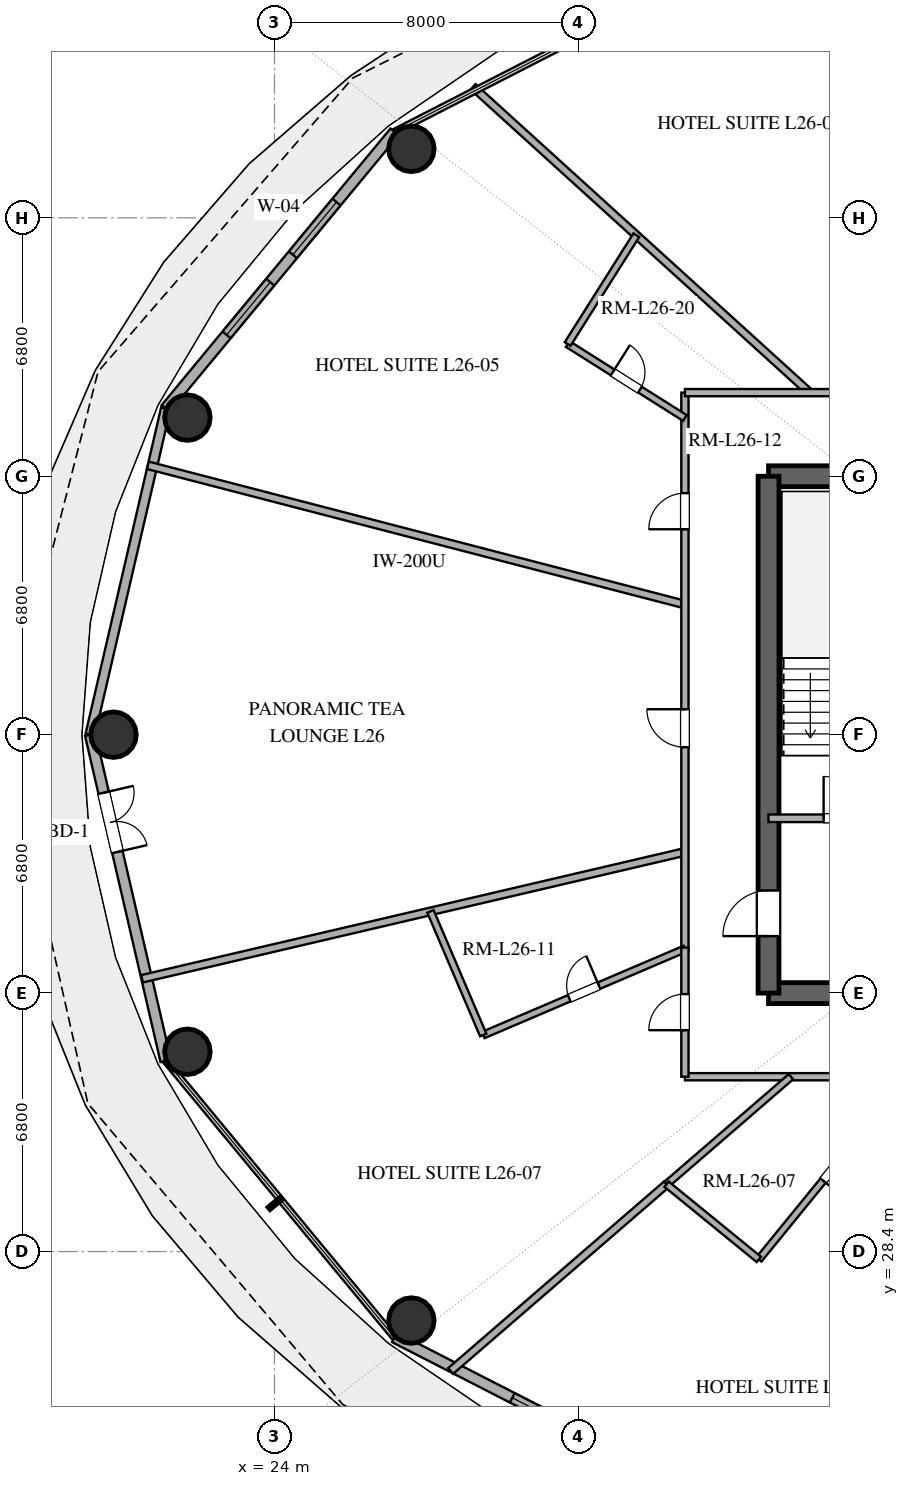
"""IFC4 building model, lengths in metres.
Left out: names, types, materials, properties, quantities, classifications, styles, units other than length and angle.
Written with IfcOpenShell. Run it as: python <this file> out.ifc"""

import sys

from ifc_helpers import new_model, si_unit, direction, frame, frame_2d, origin, origin_2d, place, context, subcontext, project, spatial, rectangle, hollow_circle, extrude, element, fill, save


model = new_model("IFC4")
c1 = context("Model", 3, precision=1e-05, world=origin(), true_north=direction((0.0, 1.0)))
c2 = subcontext(c1, "Body", "Model", "MODEL_VIEW")
j1 = project(units=[si_unit("LENGTHUNIT", "METRE"), si_unit("PLANEANGLEUNIT", "RADIAN")], contexts=[c1])
p1 = place(None, origin())
s1 = spatial("IfcSite", under=j1, at=p1, CompositionType="ELEMENT")
p2 = place(p1, origin())
s2 = spatial("IfcBuilding", under=s1, at=p2, CompositionType="ELEMENT")
p3 = place(p2, frame((0.0, 0.0, 105.6)))
s3 = spatial("IfcBuildingStorey", under=s2, at=p3, CompositionType="ELEMENT", Elevation=105.6)
for number, where, z_axis, x_axis in (
    (1, (37.0, 35.2, 0.0), (0.0, 0.0, 1.0), (1.0, 0.0, 0.0)),
    (2, (37.0, 48.8, 0.0), (0.0, 0.0, 1.0), (1.0, 0.0, 0.0)),
):
    element("IfcWall", number, at=place(p3, frame(where, z_axis=z_axis, x_axis=x_axis)), inside=s3, PredefinedType="SHEAR", context=c2, shape_type="SweptSolid", body=[
        extrude(rectangle(XDim=4.0, YDim=0.55, at=frame_2d((2.0, 0.0))), origin(), (0.0, 0.0, 1.0), 3.38),
    ])
p4 = place(p3, frame((37.0, 35.2, 0.0), z_axis=(0.0, 0.0, 1.0), x_axis=(0.0, 1.0, 0.0)))
e3 = element("IfcWall", 3, at=p4, inside=s3, PredefinedType="SHEAR", context=c2, shape_type="SweptSolid", body=[
    extrude(rectangle(XDim=13.6, YDim=0.55, at=frame_2d((6.8, 0.0))), origin(), (0.0, 0.0, 1.0), 3.38),
])
p5 = place(p4, frame((1.5, 0.0, 0.0)))
e4 = element("IfcOpeningElement", 4, at=p5, cuts=e3, PredefinedType="OPENING", context=c2, shape_type="SweptSolid", body=[
    extrude(rectangle(XDim=1.2, YDim=2.15, at=frame_2d((0.6, 1.075))), frame((0.0, 0.285, 0.0), z_axis=(0.0, -1.0, 0.0), x_axis=(1.0, 0.0, 0.0)), (0.0, 0.0, 1.0), 0.57),
])
for number, where, z_axis, x_axis in (
    (5, (27.602, 57.415, 0.0), (0.0, 0.0, 1.0), (1.0, 0.0, 0.0)),
    (6, (21.709, 50.343, 0.0), (0.0, 0.0, 1.0), (1.0, 0.0, 0.0)),
    (7, (19.763, 42.0, 0.0), (0.0, 0.0, 1.0), (1.0, 0.0, 0.0)),
    (8, (21.709, 33.657, 0.0), (0.0, 0.0, 1.0), (1.0, 0.0, 0.0)),
    (9, (27.602, 26.585, 0.0), (0.0, 0.0, 1.0), (1.0, 0.0, 0.0)),
):
    element("IfcColumn", number, at=place(p3, frame(where, z_axis=z_axis, x_axis=x_axis)), inside=s3, PredefinedType="COLUMN", context=c2, shape_type="SweptSolid", body=[
        extrude(hollow_circle(Radius=0.6, WallThickness=0.032, at=origin_2d()), origin(), (0.0, 0.0, 1.0), 3.38),
    ])
p6 = place(p3, frame((27.16, 57.86, 0.0), z_axis=(0.0, 0.0, 1.0), x_axis=(-0.637505817448, -0.770445541696, 0.0)))
e10 = element("IfcWall", 10, at=p6, inside=s3, PredefinedType="SOLIDWALL", context=c2, shape_type="SweptSolid", body=[
    extrude(rectangle(XDim=9.445, YDim=0.28, at=frame_2d((4.723, 0.0))), origin(), (0.0, 0.0, 1.0), 3.38),
])
p7 = place(p6, frame((2.396, 0.0, 0.85)))
e11 = element("IfcOpeningElement", 11, at=p7, cuts=e10, PredefinedType="OPENING", context=c2, shape_type="SweptSolid", body=[
    extrude(rectangle(XDim=1.8, YDim=2.2, at=frame_2d((0.9, 1.1))), frame((0.0, 0.15, 0.0), z_axis=(0.0, -1.0, 0.0), x_axis=(1.0, 0.0, 0.0)), (0.0, 0.0, 1.0), 0.3),
])
p8 = place(p6, frame((5.132, 0.0, 0.85)))
e12 = element("IfcOpeningElement", 12, at=p8, cuts=e10, PredefinedType="OPENING", context=c2, shape_type="SweptSolid", body=[
    extrude(rectangle(XDim=1.8, YDim=2.2, at=frame_2d((0.9, 1.1))), frame((0.0, 0.15, 0.0), z_axis=(0.0, -1.0, 0.0), x_axis=(1.0, 0.0, 0.0)), (0.0, 0.0, 1.0), 0.3),
])
p9 = place(p3, frame((21.139, 50.583, 0.0), z_axis=(0.0, 0.0, 1.0), x_axis=(-0.22558597182, -0.974223264616, 0.0)))
e13 = element("IfcWall", 13, at=p9, inside=s3, PredefinedType="SOLIDWALL", context=c2, shape_type="SweptSolid", body=[
    extrude(rectangle(XDim=8.811, YDim=0.25, at=frame_2d((4.405, 0.0))), origin(), (0.0, 0.0, 1.0), 3.38),
])
p10 = place(p3, frame((19.151, 42.0, 0.0), z_axis=(0.0, 0.0, 1.0), x_axis=(0.22558597182, -0.974223264616, 0.0)))
e14 = element("IfcWall", 14, at=p10, inside=s3, PredefinedType="SOLIDWALL", context=c2, shape_type="SweptSolid", body=[
    extrude(rectangle(XDim=8.811, YDim=0.28, at=frame_2d((4.405, 0.0))), origin(), (0.0, 0.0, 1.0), 3.38),
])
p11 = place(p10, frame((1.568, 0.0, 0.0)))
e15 = element("IfcOpeningElement", 15, at=p11, cuts=e14, PredefinedType="OPENING", context=c2, shape_type="SweptSolid", body=[
    extrude(rectangle(XDim=1.6, YDim=2.25, at=frame_2d((0.8, 1.125))), frame((0.0, 0.15, 0.0), z_axis=(0.0, -1.0, 0.0), x_axis=(1.0, 0.0, 0.0)), (0.0, 0.0, 1.0), 0.3),
])
p12 = place(p3, frame((27.16, 26.14, 0.0), z_axis=(0.0, 0.0, 1.0), x_axis=(0.889959505023, -0.45603955905, 0.0)))
e16 = element("IfcWall", 16, at=p12, inside=s3, PredefinedType="SOLIDWALL", context=c2, shape_type="SweptSolid", body=[
    extrude(rectangle(XDim=10.662, YDim=0.28, at=frame_2d((5.331, 0.0))), origin(), (0.0, 0.0, 1.0), 3.38),
])
p13 = place(p12, frame((3.481, 0.0, 0.85)))
e17 = element("IfcOpeningElement", 17, at=p13, cuts=e16, PredefinedType="OPENING", context=c2, shape_type="SweptSolid", body=[
    extrude(rectangle(XDim=1.35, YDim=1.8, at=frame_2d((0.675, 0.9))), frame((0.0, 0.15, 0.0), z_axis=(0.0, -1.0, 0.0), x_axis=(1.0, 0.0, 0.0)), (0.0, 0.0, 1.0), 0.3),
])
p14 = place(p12, frame((6.346, 0.0, 0.85)))
e18 = element("IfcOpeningElement", 18, at=p14, cuts=e16, PredefinedType="OPENING", context=c2, shape_type="SweptSolid", body=[
    extrude(rectangle(XDim=1.35, YDim=1.8, at=frame_2d((0.675, 0.9))), frame((0.0, 0.15, 0.0), z_axis=(0.0, -1.0, 0.0), x_axis=(1.0, 0.0, 0.0)), (0.0, 0.0, 1.0), 0.3),
])
p15 = place(p3, frame((37.0, 39.8, 0.0), z_axis=(0.0, 0.0, 1.0), x_axis=(1.0, 0.0, 0.0)))
e19 = element("IfcWall", 19, at=p15, inside=s3, PredefinedType="SOLIDWALL", context=c2, shape_type="SweptSolid", body=[
    extrude(rectangle(XDim=4.0, YDim=0.2, at=frame_2d((2.0, 0.0))), origin(), (0.0, 0.0, 1.0), 2.74),
])
p16 = place(p15, frame((1.45, 0.0, 0.0)))
e20 = element("IfcOpeningElement", 20, at=p16, cuts=e19, PredefinedType="OPENING", context=c2, shape_type="SweptSolid", body=[
    extrude(rectangle(XDim=1.1, YDim=2.15, at=frame_2d((0.55, 1.075))), frame((0.0, 0.11, 0.0), z_axis=(0.0, -1.0, 0.0), x_axis=(1.0, 0.0, 0.0)), (0.0, 0.0, 1.0), 0.22),
])
p17 = place(p3, frame((34.8, 45.423, 0.0), z_axis=(0.0, 0.0, 1.0), x_axis=(-0.967976280286, 0.251041671447, 0.0)))
e21 = element("IfcWall", 21, at=p17, inside=s3, PredefinedType="PARTITIONING", context=c2, shape_type="SweptSolid", body=[
    extrude(rectangle(XDim=14.598, YDim=0.2, at=frame_2d((7.299, 0.0))), origin(), (0.0, 0.0, 1.0), 2.74),
])
p18 = place(p3, frame((34.8, 38.915, 0.0), z_axis=(0.0, 0.0, 1.0), x_axis=(-0.973762218061, -0.227567885864, 0.0)))
e22 = element("IfcWall", 22, at=p18, inside=s3, PredefinedType="PARTITIONING", context=c2, shape_type="SweptSolid", body=[
    extrude(rectangle(XDim=14.67, YDim=0.2, at=frame_2d((7.335, 0.0))), origin(), (0.0, 0.0, 1.0), 2.74),
])
p19 = place(p3, frame((28.636, 25.258, 0.0), z_axis=(0.0, 0.0, 1.0), x_axis=(0.756485284597, 0.654010714124, 0.0)))
e23 = element("IfcWall", 23, at=p19, inside=s3, PredefinedType="PARTITIONING", context=c2, shape_type="SweptSolid", body=[
    extrude(rectangle(XDim=7.512, YDim=0.2, at=frame_2d((3.756, 0.0))), origin(), (0.0, 0.0, 1.0), 2.74),
])
p20 = place(p3, frame((34.8, 36.329, 0.0), z_axis=(0.0, 0.0, 1.0), x_axis=(0.0, 1.0, 0.0)))
e24 = element("IfcWall", 24, at=p20, inside=s3, PredefinedType="PARTITIONING", context=c2, shape_type="SweptSolid", body=[
    extrude(rectangle(XDim=14.671, YDim=0.19, at=frame_2d((7.336, 0.0))), origin(), (0.0, 0.0, 1.0), 2.74),
])
p21 = place(p20, frame((5.341, 0.0, 0.0)))
e25 = element("IfcOpeningElement", 25, at=p21, cuts=e24, PredefinedType="OPENING", context=c2, shape_type="SweptSolid", body=[
    extrude(rectangle(XDim=1.0, YDim=2.2, at=frame_2d((0.5, 1.1))), frame((0.0, 0.105, 0.0), z_axis=(0.0, -1.0, 0.0), x_axis=(1.0, 0.0, 0.0)), (0.0, 0.0, 1.0), 0.21),
])
p22 = place(p20, frame((11.076, 0.0, 0.0)))
e26 = element("IfcOpeningElement", 26, at=p22, cuts=e24, PredefinedType="OPENING", context=c2, shape_type="SweptSolid", body=[
    extrude(rectangle(XDim=0.95, YDim=2.15, at=frame_2d((0.475, 1.075))), frame((0.0, 0.105, 0.0), z_axis=(0.0, -1.0, 0.0), x_axis=(1.0, 0.0, 0.0)), (0.0, 0.0, 1.0), 0.21),
])
p23 = place(p3, frame((40.664, 33.0, 0.0), z_axis=(0.0, 0.0, 1.0), x_axis=(-0.631841179317, -0.775097880347, 0.0)))
e27 = element("IfcWall", 27, at=p23, inside=s3, PredefinedType="PLUMBINGWALL", context=c2, shape_type="SweptSolid", body=[
    extrude(rectangle(XDim=6.202, YDim=0.18, at=frame_2d((3.101, 0.0))), origin(), (0.0, 0.0, 1.0), 2.74),
])
p24 = place(p23, frame((2.676, 0.0, 0.0)))
e28 = element("IfcOpeningElement", 28, at=p24, cuts=e27, PredefinedType="OPENING", context=c2, shape_type="SweptSolid", body=[
    extrude(rectangle(XDim=0.85, YDim=2.1, at=frame_2d((0.425, 1.05))), frame((0.0, 0.1, 0.0), z_axis=(0.0, -1.0, 0.0), x_axis=(1.0, 0.0, 0.0)), (0.0, 0.0, 1.0), 0.2),
])
p25 = place(p3, frame((38.085, 51.0, 0.0), z_axis=(0.0, 0.0, 1.0), x_axis=(-0.74043922717, 0.672123315224, 0.0)))
e29 = element("IfcWall", 29, at=p25, inside=s3, PredefinedType="PARTITIONING", context=c2, shape_type="SweptSolid", body=[
    extrude(rectangle(XDim=11.968, YDim=0.2, at=frame_2d((5.984, 0.0))), origin(), (0.0, 0.0, 1.0), 2.74),
])
p26 = place(p3, frame((29.493, 34.097, 0.0), z_axis=(0.0, 0.0, 1.0), x_axis=(0.919684682014, 0.392657720755, 0.0)))
e30 = element("IfcWall", 30, at=p26, inside=s3, PredefinedType="PLUMBINGWALL", context=c2, shape_type="SweptSolid", body=[
    extrude(rectangle(XDim=5.771, YDim=0.18, at=frame_2d((2.885, 0.0))), origin(), (0.0, 0.0, 1.0), 2.74),
])
p27 = place(p26, frame((2.46, 0.0, 0.0)))
e31 = element("IfcOpeningElement", 31, at=p27, cuts=e30, PredefinedType="OPENING", context=c2, shape_type="SweptSolid", body=[
    extrude(rectangle(XDim=0.85, YDim=2.1, at=frame_2d((0.425, 1.05))), frame((0.0, 0.1, 0.0), z_axis=(0.0, -1.0, 0.0), x_axis=(1.0, 0.0, 0.0)), (0.0, 0.0, 1.0), 0.2),
])
p28 = place(p3, frame((34.8, 51.0, 0.0), z_axis=(0.0, 0.0, 1.0), x_axis=(1.0, 0.0, 0.0)))
e32 = element("IfcWall", 32, at=p28, inside=s3, PredefinedType="PARTITIONING", context=c2, shape_type="SweptSolid", body=[
    extrude(rectangle(XDim=9.945, YDim=0.19, at=frame_2d((4.972, 0.0))), origin(), (0.0, 0.0, 1.0), 2.74),
])
p29 = place(p28, frame((5.159, 0.0, 0.0)))
e33 = element("IfcOpeningElement", 33, at=p29, cuts=e32, PredefinedType="OPENING", context=c2, shape_type="SweptSolid", body=[
    extrude(rectangle(XDim=0.95, YDim=2.15, at=frame_2d((0.475, 1.075))), frame((0.0, 0.105, 0.0), z_axis=(0.0, -1.0, 0.0), x_axis=(1.0, 0.0, 0.0)), (0.0, 0.0, 1.0), 0.21),
])
p30 = place(p3, frame((50.648, 33.0, 0.0), z_axis=(0.0, 0.0, 1.0), x_axis=(-1.0, 0.0, 0.0)))
e34 = element("IfcWall", 34, at=p30, inside=s3, PredefinedType="PARTITIONING", context=c2, shape_type="SweptSolid", body=[
    extrude(rectangle(XDim=15.848, YDim=0.19, at=frame_2d((7.924, 0.0))), origin(), (0.0, 0.0, 1.0), 2.74),
])
p31 = place(p30, frame((3.427, 0.0, 0.0)))
e35 = element("IfcOpeningElement", 35, at=p31, cuts=e34, PredefinedType="OPENING", context=c2, shape_type="SweptSolid", body=[
    extrude(rectangle(XDim=1.0, YDim=2.2, at=frame_2d((0.5, 1.1))), frame((0.0, 0.105, 0.0), z_axis=(0.0, -1.0, 0.0), x_axis=(1.0, 0.0, 0.0)), (0.0, 0.0, 1.0), 0.21),
])
p32 = place(p30, frame((7.614, 0.0, 0.0)))
e36 = element("IfcOpeningElement", 36, at=p32, cuts=e34, PredefinedType="OPENING", context=c2, shape_type="SweptSolid", body=[
    extrude(rectangle(XDim=0.95, YDim=2.15, at=frame_2d((0.475, 1.075))), frame((0.0, 0.105, 0.0), z_axis=(0.0, -1.0, 0.0), x_axis=(1.0, 0.0, 0.0)), (0.0, 0.0, 1.0), 0.21),
])
p33 = place(p3, frame((34.319, 30.171, 0.0), z_axis=(0.0, 0.0, 1.0), x_axis=(0.756448461864, 0.654053304053, 0.0)))
e37 = element("IfcWall", 37, at=p33, inside=s3, PredefinedType="PLUMBINGWALL", context=c2, shape_type="SweptSolid", body=[
    extrude(rectangle(XDim=4.325, YDim=0.18, at=frame_2d((2.163, 0.0))), origin(), (0.0, 0.0, 1.0), 2.74),
])
p34 = place(p3, frame((31.715, 52.28, 0.0), z_axis=(0.0, 0.0, 1.0), x_axis=(0.845617675202, -0.533789047645, 0.0)))
e38 = element("IfcWall", 38, at=p34, inside=s3, PredefinedType="PLUMBINGWALL", context=c2, shape_type="SweptSolid", body=[
    extrude(rectangle(XDim=3.648, YDim=0.18, at=frame_2d((1.824, 0.0))), origin(), (0.0, 0.0, 1.0), 2.74),
])
p35 = place(p34, frame((1.399, 0.0, 0.0)))
e39 = element("IfcOpeningElement", 39, at=p35, cuts=e38, PredefinedType="OPENING", context=c2, shape_type="SweptSolid", body=[
    extrude(rectangle(XDim=0.85, YDim=2.1, at=frame_2d((0.425, 1.05))), frame((0.0, 0.1, 0.0), z_axis=(0.0, -1.0, 0.0), x_axis=(1.0, 0.0, 0.0)), (0.0, 0.0, 1.0), 0.2),
])
p36 = place(p3, frame((28.104, 37.35, 0.0), z_axis=(0.0, 0.0, 1.0), x_axis=(0.392677696951, -0.919676152957, 0.0)))
e40 = element("IfcWall", 40, at=p36, inside=s3, PredefinedType="PLUMBINGWALL", context=c2, shape_type="SweptSolid", body=[
    extrude(rectangle(XDim=3.537, YDim=0.18, at=frame_2d((1.769, 0.0))), origin(), (0.0, 0.0, 1.0), 2.74),
])
p37 = place(p3, frame((34.8, 33.0, 0.0), z_axis=(0.0, 0.0, 1.0), x_axis=(0.0, 1.0, 0.0)))
e41 = element("IfcWall", 41, at=p37, inside=s3, PredefinedType="PARTITIONING", context=c2, shape_type="SweptSolid", body=[
    extrude(rectangle(XDim=3.398, YDim=0.19, at=frame_2d((1.699, 0.0))), origin(), (0.0, 0.0, 1.0), 2.74),
])
p38 = place(p37, frame((1.224, 0.0, 0.0)))
e42 = element("IfcOpeningElement", 42, at=p38, cuts=e41, PredefinedType="OPENING", context=c2, shape_type="SweptSolid", body=[
    extrude(rectangle(XDim=0.95, YDim=2.15, at=frame_2d((0.475, 1.075))), frame((0.0, 0.105, 0.0), z_axis=(0.0, -1.0, 0.0), x_axis=(1.0, 0.0, 0.0)), (0.0, 0.0, 1.0), 0.21),
])
p39 = place(p3, frame((33.522, 55.142, 0.0), z_axis=(0.0, 0.0, 1.0), x_axis=(-0.533805735916, -0.845607140641, 0.0)))
e43 = element("IfcWall", 43, at=p39, inside=s3, PredefinedType="PLUMBINGWALL", context=c2, shape_type="SweptSolid", body=[
    extrude(rectangle(XDim=3.385, YDim=0.18, at=frame_2d((1.692, 0.0))), origin(), (0.0, 0.0, 1.0), 2.74),
])
p40 = place(p3, frame((36.745, 28.193, 0.0), z_axis=(0.0, 0.0, 1.0), x_axis=(-0.775130314585, 0.631801389212, 0.0)))
e44 = element("IfcWall", 44, at=p40, inside=s3, PredefinedType="PLUMBINGWALL", context=c2, shape_type="SweptSolid", body=[
    extrude(rectangle(XDim=3.131, YDim=0.18, at=frame_2d((1.565, 0.0))), origin(), (0.0, 0.0, 1.0), 2.74),
])
p41 = place(p7, origin())
e45 = element("IfcWindow", 45, at=p41, inside=s3, PartitioningType="SINGLE_PANEL", PredefinedType="WINDOW", context=c2, shape_type="SweptSolid", body=[
    extrude(rectangle(XDim=1.8, YDim=2.2, at=frame_2d((0.9, 1.1))), frame((0.0, 0.03, 0.0), z_axis=(0.0, -1.0, 0.0), x_axis=(1.0, 0.0, 0.0)), (0.0, 0.0, 1.0), 0.06),
])
fill(e11, e45)
p42 = place(p8, origin())
e46 = element("IfcWindow", 46, at=p42, inside=s3, PartitioningType="SINGLE_PANEL", PredefinedType="WINDOW", context=c2, shape_type="SweptSolid", body=[
    extrude(rectangle(XDim=1.8, YDim=2.2, at=frame_2d((0.9, 1.1))), frame((0.0, 0.03, 0.0), z_axis=(0.0, -1.0, 0.0), x_axis=(1.0, 0.0, 0.0)), (0.0, 0.0, 1.0), 0.06),
])
fill(e12, e46)
p43 = place(p11, origin())
e47 = element("IfcDoor", 47, at=p43, inside=s3, OperationType="DOUBLE_DOOR_SINGLE_SWING", PredefinedType="DOOR", context=c2, shape_type="SweptSolid", body=[
    extrude(rectangle(XDim=1.6, YDim=2.25, at=frame_2d((0.8, 1.125))), frame((0.0, 0.025, 0.0), z_axis=(0.0, -1.0, 0.0), x_axis=(1.0, 0.0, 0.0)), (0.0, 0.0, 1.0), 0.05),
])
fill(e15, e47)
p44 = place(p13, origin())
e48 = element("IfcWindow", 48, at=p44, inside=s3, PartitioningType="SINGLE_PANEL", PredefinedType="WINDOW", context=c2, shape_type="SweptSolid", body=[
    extrude(rectangle(XDim=1.35, YDim=1.8, at=frame_2d((0.675, 0.9))), frame((0.0, 0.03, 0.0), z_axis=(0.0, -1.0, 0.0), x_axis=(1.0, 0.0, 0.0)), (0.0, 0.0, 1.0), 0.06),
])
fill(e17, e48)
p45 = place(p5, origin())
e49 = element("IfcDoor", 49, at=p45, inside=s3, OperationType="SINGLE_SWING_LEFT", PredefinedType="DOOR", context=c2, shape_type="SweptSolid", body=[
    extrude(rectangle(XDim=1.2, YDim=2.15, at=frame_2d((0.6, 1.075))), frame((0.0, 0.025, 0.0), z_axis=(0.0, -1.0, 0.0), x_axis=(1.0, 0.0, 0.0)), (0.0, 0.0, 1.0), 0.05),
])
fill(e4, e49)
p46 = place(p16, origin())
e50 = element("IfcDoor", 50, at=p46, inside=s3, OperationType="SINGLE_SWING_LEFT", PredefinedType="DOOR", context=c2, shape_type="SweptSolid", body=[
    extrude(rectangle(XDim=1.1, YDim=2.15, at=frame_2d((0.55, 1.075))), frame((0.0, 0.025, 0.0), z_axis=(0.0, -1.0, 0.0), x_axis=(1.0, 0.0, 0.0)), (0.0, 0.0, 1.0), 0.05),
])
fill(e20, e50)
p47 = place(p21, origin())
e51 = element("IfcDoor", 51, at=p47, inside=s3, OperationType="SINGLE_SWING_RIGHT", PredefinedType="DOOR", context=c2, shape_type="SweptSolid", body=[
    extrude(rectangle(XDim=1.0, YDim=2.2, at=frame_2d((0.5, 1.1))), frame((0.0, 0.025, 0.0), z_axis=(0.0, -1.0, 0.0), x_axis=(1.0, 0.0, 0.0)), (0.0, 0.0, 1.0), 0.05),
])
fill(e25, e51)
p48 = place(p22, origin())
e52 = element("IfcDoor", 52, at=p48, inside=s3, OperationType="SINGLE_SWING_LEFT", PredefinedType="DOOR", context=c2, shape_type="SweptSolid", body=[
    extrude(rectangle(XDim=0.95, YDim=2.15, at=frame_2d((0.475, 1.075))), frame((0.0, 0.025, 0.0), z_axis=(0.0, -1.0, 0.0), x_axis=(1.0, 0.0, 0.0)), (0.0, 0.0, 1.0), 0.05),
])
fill(e26, e52)
p49 = place(p24, origin())
e53 = element("IfcDoor", 53, at=p49, inside=s3, OperationType="SINGLE_SWING_RIGHT", PredefinedType="DOOR", context=c2, shape_type="SweptSolid", body=[
    extrude(rectangle(XDim=0.85, YDim=2.1, at=frame_2d((0.425, 1.05))), frame((0.0, 0.025, 0.0), z_axis=(0.0, -1.0, 0.0), x_axis=(1.0, 0.0, 0.0)), (0.0, 0.0, 1.0), 0.05),
])
fill(e28, e53)
p50 = place(p27, origin())
e54 = element("IfcDoor", 54, at=p50, inside=s3, OperationType="SINGLE_SWING_RIGHT", PredefinedType="DOOR", context=c2, shape_type="SweptSolid", body=[
    extrude(rectangle(XDim=0.85, YDim=2.1, at=frame_2d((0.425, 1.05))), frame((0.0, 0.025, 0.0), z_axis=(0.0, -1.0, 0.0), x_axis=(1.0, 0.0, 0.0)), (0.0, 0.0, 1.0), 0.05),
])
fill(e31, e54)
p51 = place(p35, origin())
e55 = element("IfcDoor", 55, at=p51, inside=s3, OperationType="SINGLE_SWING_LEFT", PredefinedType="DOOR", context=c2, shape_type="SweptSolid", body=[
    extrude(rectangle(XDim=0.85, YDim=2.1, at=frame_2d((0.425, 1.05))), frame((0.0, 0.025, 0.0), z_axis=(0.0, -1.0, 0.0), x_axis=(1.0, 0.0, 0.0)), (0.0, 0.0, 1.0), 0.05),
])
fill(e39, e55)
p52 = place(p38, origin())
e56 = element("IfcDoor", 56, at=p52, inside=s3, OperationType="SINGLE_SWING_LEFT", PredefinedType="DOOR", context=c2, shape_type="SweptSolid", body=[
    extrude(rectangle(XDim=0.95, YDim=2.15, at=frame_2d((0.475, 1.075))), frame((0.0, 0.025, 0.0), z_axis=(0.0, -1.0, 0.0), x_axis=(1.0, 0.0, 0.0)), (0.0, 0.0, 1.0), 0.05),
])
fill(e42, e56)
save(model, sys.argv[1])
